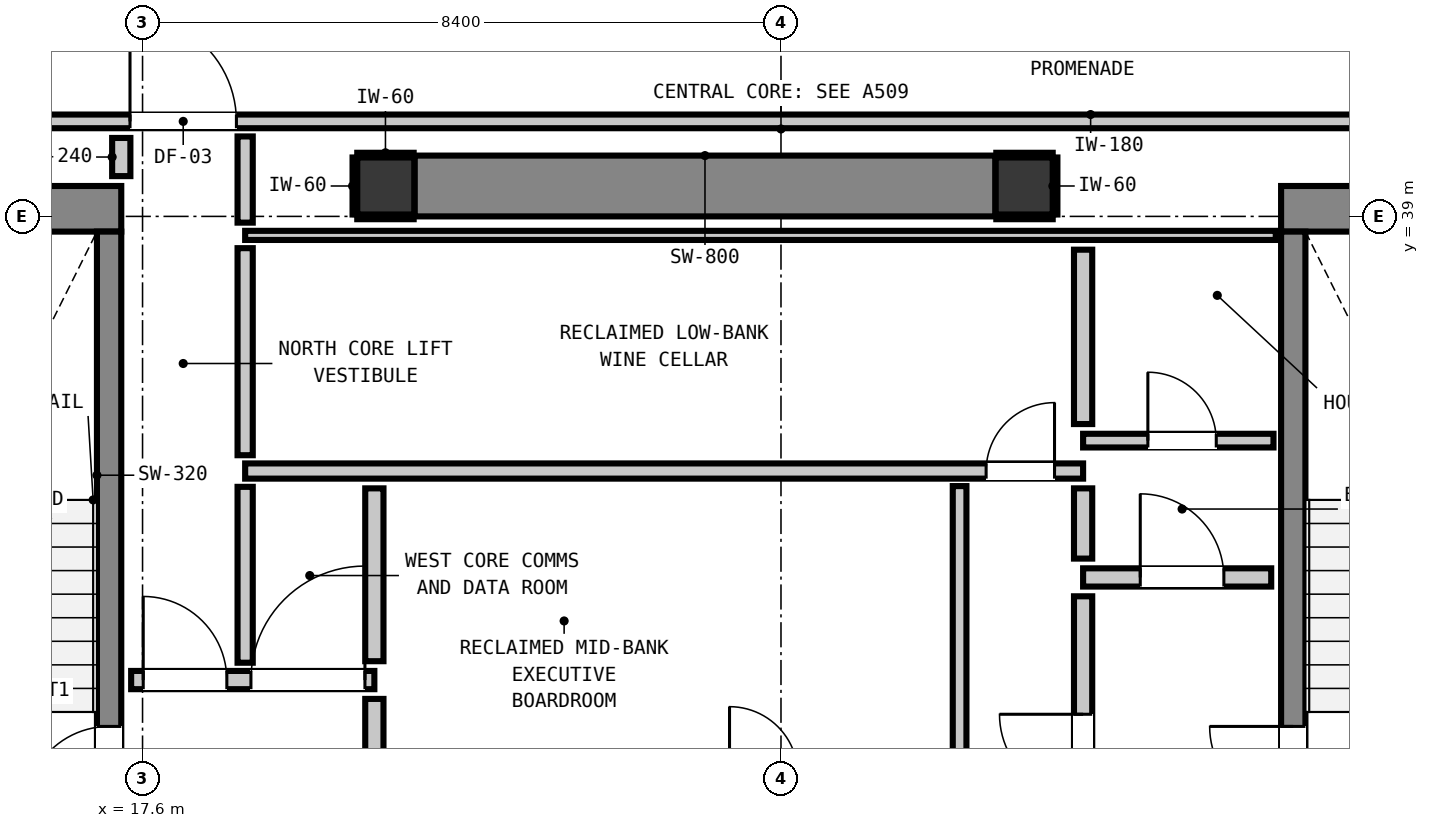
"""IFC4 building model, lengths in metres.
Left out: names, types, materials, properties, quantities, classifications, styles, units other than length and angle.
Written with IfcOpenShell. Run it as: python <this file> out.ifc"""

import sys

from ifc_helpers import new_model, si_unit, direction, frame, frame_2d, origin, origin_2d, place, context, subcontext, project, spatial, rectangle, extrude, element, fill, save


model = new_model("IFC4")
c1 = context("Model", 3, precision=1e-05, world=origin(), true_north=direction((0.0, 1.0)))
c2 = subcontext(c1, "Body", "Model", "MODEL_VIEW")
j1 = project(units=[si_unit("LENGTHUNIT", "METRE"), si_unit("PLANEANGLEUNIT", "RADIAN")], contexts=[c1])
p1 = place(None, origin())
s1 = spatial("IfcSite", under=j1, at=p1, CompositionType="ELEMENT")
p2 = place(p1, origin())
s2 = spatial("IfcBuilding", under=s1, at=p2, CompositionType="ELEMENT")
p3 = place(p2, frame((0.0, 0.0, 193.48)))
s3 = spatial("IfcBuildingStorey", under=s2, at=p3, CompositionType="ELEMENT", Elevation=193.48)
for number, where, z_axis, x_axis in (
    (1, (20.8, 39.4, 0.0), (0.0, 0.0, 1.0), (1.0, 0.0, 0.0)),
    (2, (29.2, 39.4, 0.0), (0.0, 0.0, 1.0), (1.0, 0.0, 0.0)),
):
    element("IfcColumn", number, at=place(p3, frame(where, z_axis=z_axis, x_axis=x_axis)), inside=s3, PredefinedType="COLUMN", context=c2, shape_type="SweptSolid", body=[
        extrude(rectangle(XDim=0.75, YDim=0.75, at=origin_2d()), origin(), (0.0, 0.0, 1.0), 3.32),
    ])
p4 = place(p3, frame((13.24, 39.1, 0.0), z_axis=(0.0, 0.0, 1.0), x_axis=(1.0, 0.0, 0.0)))
e3 = element("IfcWall", 3, at=p4, inside=s3, PredefinedType="SHEAR", context=c2, shape_type="SweptSolid", body=[
    extrude(rectangle(XDim=4.08, YDim=0.6, at=frame_2d((2.04, 0.0))), origin(), (0.0, 0.0, 1.0), 3.32),
])
p5 = place(p3, frame((32.58, 39.1, 0.0), z_axis=(0.0, 0.0, 1.0), x_axis=(1.0, 0.0, 0.0)))
e4 = element("IfcWall", 4, at=p5, inside=s3, PredefinedType="SHEAR", context=c2, shape_type="SweptSolid", body=[
    extrude(rectangle(XDim=4.08, YDim=0.6, at=frame_2d((2.04, 0.0))), origin(), (0.0, 0.0, 1.0), 3.32),
])
p6 = place(p3, frame((21.18, 39.4, 0.0), z_axis=(0.0, 0.0, 1.0), x_axis=(1.0, 0.0, 0.0)))
e5 = element("IfcWall", 5, at=p6, inside=s3, PredefinedType="SHEAR", context=c2, shape_type="SweptSolid", body=[
    extrude(rectangle(XDim=7.64, YDim=0.8, at=frame_2d((3.82, 0.0))), origin(), (0.0, 0.0, 1.0), 3.32),
])
p7 = place(p3, frame((17.16, 31.0, 0.0), z_axis=(0.0, 0.0, 1.0), x_axis=(0.0, 1.0, 0.0)))
e6 = element("IfcWall", 6, at=p7, inside=s3, PredefinedType="SHEAR", context=c2, shape_type="SweptSolid", body=[
    extrude(rectangle(XDim=7.8, YDim=0.32, at=frame_2d((3.9, 0.0))), origin(), (0.0, 0.0, 1.0), 3.32),
])
p8 = place(p7, frame((0.19, 0.0, 0.0)))
e7 = element("IfcOpeningElement", 7, at=p8, cuts=e6, PredefinedType="OPENING", context=c2, shape_type="SweptSolid", body=[
    extrude(rectangle(XDim=1.1, YDim=2.15, at=frame_2d((0.55, 1.075))), frame((0.0, 0.17, 0.0), z_axis=(0.0, -1.0, 0.0), x_axis=(1.0, 0.0, 0.0)), (0.0, 0.0, 1.0), 0.34),
])
p9 = place(p3, frame((32.74, 31.0, 0.0), z_axis=(0.0, 0.0, 1.0), x_axis=(0.0, 1.0, 0.0)))
e8 = element("IfcWall", 8, at=p9, inside=s3, PredefinedType="SHEAR", context=c2, shape_type="SweptSolid", body=[
    extrude(rectangle(XDim=7.8, YDim=0.32, at=frame_2d((3.9, 0.0))), origin(), (0.0, 0.0, 1.0), 3.32),
])
p10 = place(p9, frame((0.19, 0.0, 0.0)))
e9 = element("IfcOpeningElement", 9, at=p10, cuts=e8, PredefinedType="OPENING", context=c2, shape_type="SweptSolid", body=[
    extrude(rectangle(XDim=1.1, YDim=2.15, at=frame_2d((0.55, 1.075))), frame((0.0, 0.17, 0.0), z_axis=(0.0, -1.0, 0.0), x_axis=(1.0, 0.0, 0.0)), (0.0, 0.0, 1.0), 0.34),
])
p11 = place(p3, frame((17.45, 32.9, 0.0), z_axis=(0.0, 0.0, 1.0), x_axis=(1.0, 0.0, 0.0)))
e10 = element("IfcWall", 10, at=p11, inside=s3, PredefinedType="PARTITIONING", context=c2, shape_type="SweptSolid", body=[
    extrude(rectangle(XDim=3.2, YDim=0.24, at=frame_2d((1.6, 0.0))), origin(), (0.0, 0.0, 1.0), 3.1),
])
p12 = place(p11, frame((0.159, 0.0, 0.0)))
e11 = element("IfcOpeningElement", 11, at=p12, cuts=e10, PredefinedType="OPENING", context=c2, shape_type="SweptSolid", body=[
    extrude(rectangle(XDim=1.1, YDim=2.15, at=frame_2d((0.55, 1.075))), frame((0.0, 0.13, 0.0), z_axis=(0.0, -1.0, 0.0), x_axis=(1.0, 0.0, 0.0)), (0.0, 0.0, 1.0), 0.26),
])
p13 = place(p11, frame((1.576, 0.0, 0.0)))
e12 = element("IfcOpeningElement", 12, at=p13, cuts=e10, PredefinedType="OPENING", context=c2, shape_type="SweptSolid", body=[
    extrude(rectangle(XDim=1.5, YDim=2.15, at=frame_2d((0.75, 1.075))), frame((0.0, 0.13, 0.0), z_axis=(0.0, -1.0, 0.0), x_axis=(1.0, 0.0, 0.0)), (0.0, 0.0, 1.0), 0.26),
])
p14 = place(p3, frame((29.975, 34.25, 0.0), z_axis=(0.0, 0.0, 1.0), x_axis=(1.0, 0.0, 0.0)))
e13 = element("IfcWall", 13, at=p14, inside=s3, PredefinedType="PARTITIONING", context=c2, shape_type="SweptSolid", body=[
    extrude(rectangle(XDim=2.475, YDim=0.24, at=frame_2d((1.237, 0.0))), origin(), (0.0, 0.0, 1.0), 3.1),
])
p15 = place(p14, frame((0.752, 0.0, 0.0)))
e14 = element("IfcOpeningElement", 14, at=p15, cuts=e13, PredefinedType="OPENING", context=c2, shape_type="SweptSolid", body=[
    extrude(rectangle(XDim=1.1, YDim=2.15, at=frame_2d((0.55, 1.075))), frame((0.0, 0.13, 0.0), z_axis=(0.0, -1.0, 0.0), x_axis=(1.0, 0.0, 0.0)), (0.0, 0.0, 1.0), 0.26),
])
p16 = place(p3, frame((18.95, 35.65, 0.0), z_axis=(0.0, 0.0, 1.0), x_axis=(1.0, 0.0, 0.0)))
e15 = element("IfcWall", 15, at=p16, inside=s3, PredefinedType="PARTITIONING", context=c2, shape_type="SweptSolid", body=[
    extrude(rectangle(XDim=11.025, YDim=0.2, at=frame_2d((5.513, 0.0))), origin(), (0.0, 0.0, 1.0), 3.1),
])
p17 = place(p16, frame((9.749, 0.0, 0.0)))
e16 = element("IfcOpeningElement", 16, at=p17, cuts=e15, PredefinedType="OPENING", context=c2, shape_type="SweptSolid", body=[
    extrude(rectangle(XDim=0.9, YDim=2.1, at=frame_2d((0.45, 1.05))), frame((0.0, 0.11, 0.0), z_axis=(0.0, -1.0, 0.0), x_axis=(1.0, 0.0, 0.0)), (0.0, 0.0, 1.0), 0.22),
])
p18 = place(p3, frame((29.975, 36.05, 0.0), z_axis=(0.0, 0.0, 1.0), x_axis=(1.0, 0.0, 0.0)))
e17 = element("IfcWall", 17, at=p18, inside=s3, PredefinedType="PARTITIONING", context=c2, shape_type="SweptSolid", body=[
    extrude(rectangle(XDim=2.505, YDim=0.18, at=frame_2d((1.252, 0.0))), origin(), (0.0, 0.0, 1.0), 3.1),
])
p19 = place(p18, frame((0.852, 0.0, 0.0)))
e18 = element("IfcOpeningElement", 18, at=p19, cuts=e17, PredefinedType="OPENING", context=c2, shape_type="SweptSolid", body=[
    extrude(rectangle(XDim=0.9, YDim=2.1, at=frame_2d((0.45, 1.05))), frame((0.0, 0.1, 0.0), z_axis=(0.0, -1.0, 0.0), x_axis=(1.0, 0.0, 0.0)), (0.0, 0.0, 1.0), 0.2),
])
p20 = place(p3, frame((13.012, 40.25, 0.0), z_axis=(0.0, 0.0, 1.0), x_axis=(1.0, 0.0, 0.0)))
e19 = element("IfcWall", 19, at=p20, inside=s3, PredefinedType="PARTITIONING", context=c2, shape_type="SweptSolid", body=[
    extrude(rectangle(XDim=28.201, YDim=0.18, at=frame_2d((14.101, 0.0))), origin(), (0.0, 0.0, 1.0), 3.1),
])
p21 = place(p20, frame((4.423, 0.0, 0.0)))
e20 = element("IfcOpeningElement", 20, at=p21, cuts=e19, PredefinedType="OPENING", context=c2, shape_type="SweptSolid", body=[
    extrude(rectangle(XDim=1.4, YDim=2.15, at=frame_2d((0.7, 1.075))), frame((0.0, 0.1, 0.0), z_axis=(0.0, -1.0, 0.0), x_axis=(1.0, 0.0, 0.0)), (0.0, 0.0, 1.0), 0.2),
])
p22 = place(p3, frame((18.95, 38.75, 0.0), z_axis=(0.0, 0.0, 1.0), x_axis=(1.0, 0.0, 0.0)))
e21 = element("IfcWall", 21, at=p22, inside=s3, PredefinedType="PARTITIONING", context=c2, shape_type="SweptSolid", body=[
    extrude(rectangle(XDim=13.56, YDim=0.12, at=frame_2d((6.78, 0.0))), origin(), (0.0, 0.0, 1.0), 3.1),
])
p23 = place(p3, frame((17.32, 39.53, 0.0), z_axis=(0.0, 0.0, 1.0), x_axis=(0.0, 1.0, 0.0)))
e22 = element("IfcWall", 22, at=p23, inside=s3, PredefinedType="PARTITIONING", context=c2, shape_type="SweptSolid", body=[
    extrude(rectangle(XDim=0.502, YDim=0.24, at=frame_2d((0.251, 0.0))), origin(), (0.0, 0.0, 1.0), 3.1),
])
p24 = place(p3, frame((20.65, 31.868, 0.0), z_axis=(0.0, 0.0, 1.0), x_axis=(0.0, 1.0, 0.0)))
e23 = element("IfcWall", 23, at=p24, inside=s3, PredefinedType="PARTITIONING", context=c2, shape_type="SweptSolid", body=[
    extrude(rectangle(XDim=0.784, YDim=0.24, at=frame_2d((0.392, 0.0))), origin(), (0.0, 0.0, 1.0), 2.335),
])
p25 = place(p3, frame((20.65, 33.148, 0.0), z_axis=(0.0, 0.0, 1.0), x_axis=(0.0, 1.0, 0.0)))
e24 = element("IfcWall", 24, at=p25, inside=s3, PredefinedType="PARTITIONING", context=c2, shape_type="SweptSolid", body=[
    extrude(rectangle(XDim=2.274, YDim=0.24, at=frame_2d((1.137, 0.0))), origin(), (0.0, 0.0, 1.0), 2.335),
])
p26 = place(p3, frame((29.975, 29.768, 0.0), z_axis=(0.0, 0.0, 1.0), x_axis=(0.0, 1.0, 0.0)))
e25 = element("IfcWall", 25, at=p26, inside=s3, PredefinedType="PARTITIONING", context=c2, shape_type="SweptSolid", body=[
    extrude(rectangle(XDim=4.234, YDim=0.24, at=frame_2d((2.117, 0.0))), origin(), (0.0, 0.0, 1.0), 3.1),
])
p27 = place(p26, frame((1.582, 0.0, 0.0)))
e26 = element("IfcOpeningElement", 26, at=p27, cuts=e25, PredefinedType="OPENING", context=c2, shape_type="SweptSolid", body=[
    extrude(rectangle(XDim=1.1, YDim=2.15, at=frame_2d((0.55, 1.075))), frame((0.0, 0.13, 0.0), z_axis=(0.0, -1.0, 0.0), x_axis=(1.0, 0.0, 0.0)), (0.0, 0.0, 1.0), 0.26),
])
p28 = place(p3, frame((29.975, 34.498, 0.0), z_axis=(0.0, 0.0, 1.0), x_axis=(0.0, 1.0, 0.0)))
e27 = element("IfcWall", 27, at=p28, inside=s3, PredefinedType="PARTITIONING", context=c2, shape_type="SweptSolid", body=[
    extrude(rectangle(XDim=0.924, YDim=0.24, at=frame_2d((0.462, 0.0))), origin(), (0.0, 0.0, 1.0), 3.1),
])
p29 = place(p3, frame((29.975, 36.268, 0.0), z_axis=(0.0, 0.0, 1.0), x_axis=(0.0, 1.0, 0.0)))
e28 = element("IfcWall", 28, at=p29, inside=s3, PredefinedType="PARTITIONING", context=c2, shape_type="SweptSolid", body=[
    extrude(rectangle(XDim=2.294, YDim=0.24, at=frame_2d((1.147, 0.0))), origin(), (0.0, 0.0, 1.0), 3.1),
])
p30 = place(p3, frame((18.95, 33.128, 0.0), z_axis=(0.0, 0.0, 1.0), x_axis=(0.0, 1.0, 0.0)))
e29 = element("IfcWall", 29, at=p30, inside=s3, PredefinedType="PARTITIONING", context=c2, shape_type="SweptSolid", body=[
    extrude(rectangle(XDim=2.314, YDim=0.2, at=frame_2d((1.157, 0.0))), origin(), (0.0, 0.0, 1.0), 3.1),
])
p31 = place(p3, frame((18.95, 35.858, 0.0), z_axis=(0.0, 0.0, 1.0), x_axis=(0.0, 1.0, 0.0)))
e30 = element("IfcWall", 30, at=p31, inside=s3, PredefinedType="PARTITIONING", context=c2, shape_type="SweptSolid", body=[
    extrude(rectangle(XDim=2.724, YDim=0.2, at=frame_2d((1.362, 0.0))), origin(), (0.0, 0.0, 1.0), 3.1),
])
p32 = place(p3, frame((18.95, 38.918, 0.0), z_axis=(0.0, 0.0, 1.0), x_axis=(0.0, 1.0, 0.0)))
e31 = element("IfcWall", 31, at=p32, inside=s3, PredefinedType="PARTITIONING", context=c2, shape_type="SweptSolid", body=[
    extrude(rectangle(XDim=1.134, YDim=0.2, at=frame_2d((0.567, 0.0))), origin(), (0.0, 0.0, 1.0), 3.1),
])
p33 = place(p3, frame((28.35, 31.838, 0.0), z_axis=(0.0, 0.0, 1.0), x_axis=(0.0, 1.0, 0.0)))
e32 = element("IfcWall", 32, at=p33, inside=s3, PredefinedType="PARTITIONING", context=c2, shape_type="SweptSolid", body=[
    extrude(rectangle(XDim=3.614, YDim=0.18, at=frame_2d((1.807, 0.0))), origin(), (0.0, 0.0, 1.0), 3.1),
])
for number, where, z_axis, x_axis in (
    (33, (20.425, 38.993, 0.0), (0.0, 0.0, 1.0), (1.0, 0.0, 0.0)),
    (34, (20.425, 39.807, 0.0), (0.0, 0.0, 1.0), (1.0, 0.0, 0.0)),
):
    element("IfcWall", number, at=place(p3, frame(where, z_axis=z_axis, x_axis=x_axis)), inside=s3, PredefinedType="PARTITIONING", context=c2, shape_type="SweptSolid", body=[
        extrude(rectangle(XDim=0.742, YDim=0.06, at=frame_2d((0.371, 0.0))), origin(), (0.0, 0.0, 1.0), 1.45),
    ])
p34 = place(p3, frame((20.393, 39.025, 0.0), z_axis=(0.0, 0.0, 1.0), x_axis=(0.0, 1.0, 0.0)))
e35 = element("IfcWall", 35, at=p34, inside=s3, PredefinedType="PARTITIONING", context=c2, shape_type="SweptSolid", body=[
    extrude(rectangle(XDim=0.75, YDim=0.06, at=frame_2d((0.375, 0.0))), origin(), (0.0, 0.0, 1.0), 1.45),
])
for number, where, z_axis, x_axis in (
    (36, (28.833, 38.993, 0.0), (0.0, 0.0, 1.0), (1.0, 0.0, 0.0)),
    (37, (28.833, 39.807, 0.0), (0.0, 0.0, 1.0), (1.0, 0.0, 0.0)),
):
    element("IfcWall", number, at=place(p3, frame(where, z_axis=z_axis, x_axis=x_axis)), inside=s3, PredefinedType="PARTITIONING", context=c2, shape_type="SweptSolid", body=[
        extrude(rectangle(XDim=0.742, YDim=0.06, at=frame_2d((0.371, 0.0))), origin(), (0.0, 0.0, 1.0), 1.45),
    ])
p35 = place(p3, frame((29.607, 39.025, 0.0), z_axis=(0.0, 0.0, 1.0), x_axis=(0.0, 1.0, 0.0)))
e38 = element("IfcWall", 38, at=p35, inside=s3, PredefinedType="PARTITIONING", context=c2, shape_type="SweptSolid", body=[
    extrude(rectangle(XDim=0.75, YDim=0.06, at=frame_2d((0.375, 0.0))), origin(), (0.0, 0.0, 1.0), 1.45),
])
p36 = place(p8, origin())
e39 = element("IfcDoor", 39, at=p36, inside=s3, OperationType="SINGLE_SWING_LEFT", PredefinedType="DOOR", context=c2, shape_type="SweptSolid", body=[
    extrude(rectangle(XDim=1.1, YDim=2.15, at=frame_2d((0.55, 1.075))), frame((0.0, 0.025, 0.0), z_axis=(0.0, -1.0, 0.0), x_axis=(1.0, 0.0, 0.0)), (0.0, 0.0, 1.0), 0.05),
])
fill(e7, e39)
p37 = place(p10, origin())
e40 = element("IfcDoor", 40, at=p37, inside=s3, OperationType="SINGLE_SWING_RIGHT", PredefinedType="DOOR", context=c2, shape_type="SweptSolid", body=[
    extrude(rectangle(XDim=1.1, YDim=2.15, at=frame_2d((0.55, 1.075))), frame((0.0, 0.025, 0.0), z_axis=(0.0, -1.0, 0.0), x_axis=(1.0, 0.0, 0.0)), (0.0, 0.0, 1.0), 0.05),
])
fill(e9, e40)
p38 = place(p12, origin())
e41 = element("IfcDoor", 41, at=p38, inside=s3, OperationType="SINGLE_SWING_LEFT", PredefinedType="DOOR", context=c2, shape_type="SweptSolid", body=[
    extrude(rectangle(XDim=1.1, YDim=2.15, at=frame_2d((0.55, 1.075))), frame((0.0, 0.025, 0.0), z_axis=(0.0, -1.0, 0.0), x_axis=(1.0, 0.0, 0.0)), (0.0, 0.0, 1.0), 0.05),
])
fill(e11, e41)
p39 = place(p27, origin())
e42 = element("IfcDoor", 42, at=p39, inside=s3, OperationType="SINGLE_SWING_RIGHT", PredefinedType="DOOR", context=c2, shape_type="SweptSolid", body=[
    extrude(rectangle(XDim=1.1, YDim=2.15, at=frame_2d((0.55, 1.075))), frame((0.0, 0.025, 0.0), z_axis=(0.0, -1.0, 0.0), x_axis=(1.0, 0.0, 0.0)), (0.0, 0.0, 1.0), 0.05),
])
fill(e26, e42)
p40 = place(p15, origin())
e43 = element("IfcDoor", 43, at=p40, inside=s3, OperationType="SINGLE_SWING_LEFT", PredefinedType="DOOR", context=c2, shape_type="SweptSolid", body=[
    extrude(rectangle(XDim=1.1, YDim=2.15, at=frame_2d((0.55, 1.075))), frame((0.0, 0.025, 0.0), z_axis=(0.0, -1.0, 0.0), x_axis=(1.0, 0.0, 0.0)), (0.0, 0.0, 1.0), 0.05),
])
fill(e14, e43)
p41 = place(p21, origin())
e44 = element("IfcDoor", 44, at=p41, inside=s3, OperationType="SINGLE_SWING_LEFT", PredefinedType="DOOR", context=c2, shape_type="SweptSolid", body=[
    extrude(rectangle(XDim=1.4, YDim=2.15, at=frame_2d((0.7, 1.075))), frame((0.0, 0.025, 0.0), z_axis=(0.0, -1.0, 0.0), x_axis=(1.0, 0.0, 0.0)), (0.0, 0.0, 1.0), 0.05),
])
fill(e20, e44)
p42 = place(p13, origin())
e45 = element("IfcDoor", 45, at=p42, inside=s3, OperationType="SINGLE_SWING_RIGHT", PredefinedType="DOOR", context=c2, shape_type="SweptSolid", body=[
    extrude(rectangle(XDim=1.5, YDim=2.15, at=frame_2d((0.75, 1.075))), frame((0.0, 0.025, 0.0), z_axis=(0.0, -1.0, 0.0), x_axis=(1.0, 0.0, 0.0)), (0.0, 0.0, 1.0), 0.05),
])
fill(e12, e45)
p43 = place(p19, origin())
e46 = element("IfcDoor", 46, at=p43, inside=s3, OperationType="SINGLE_SWING_LEFT", PredefinedType="DOOR", context=c2, shape_type="SweptSolid", body=[
    extrude(rectangle(XDim=0.9, YDim=2.1, at=frame_2d((0.45, 1.05))), frame((0.0, 0.025, 0.0), z_axis=(0.0, -1.0, 0.0), x_axis=(1.0, 0.0, 0.0)), (0.0, 0.0, 1.0), 0.05),
])
fill(e18, e46)
p44 = place(p17, origin())
e47 = element("IfcDoor", 47, at=p44, inside=s3, OperationType="SINGLE_SWING_RIGHT", PredefinedType="DOOR", context=c2, shape_type="SweptSolid", body=[
    extrude(rectangle(XDim=0.9, YDim=2.1, at=frame_2d((0.45, 1.05))), frame((0.0, 0.025, 0.0), z_axis=(0.0, -1.0, 0.0), x_axis=(1.0, 0.0, 0.0)), (0.0, 0.0, 1.0), 0.05),
])
fill(e16, e47)
save(model, sys.argv[1])
